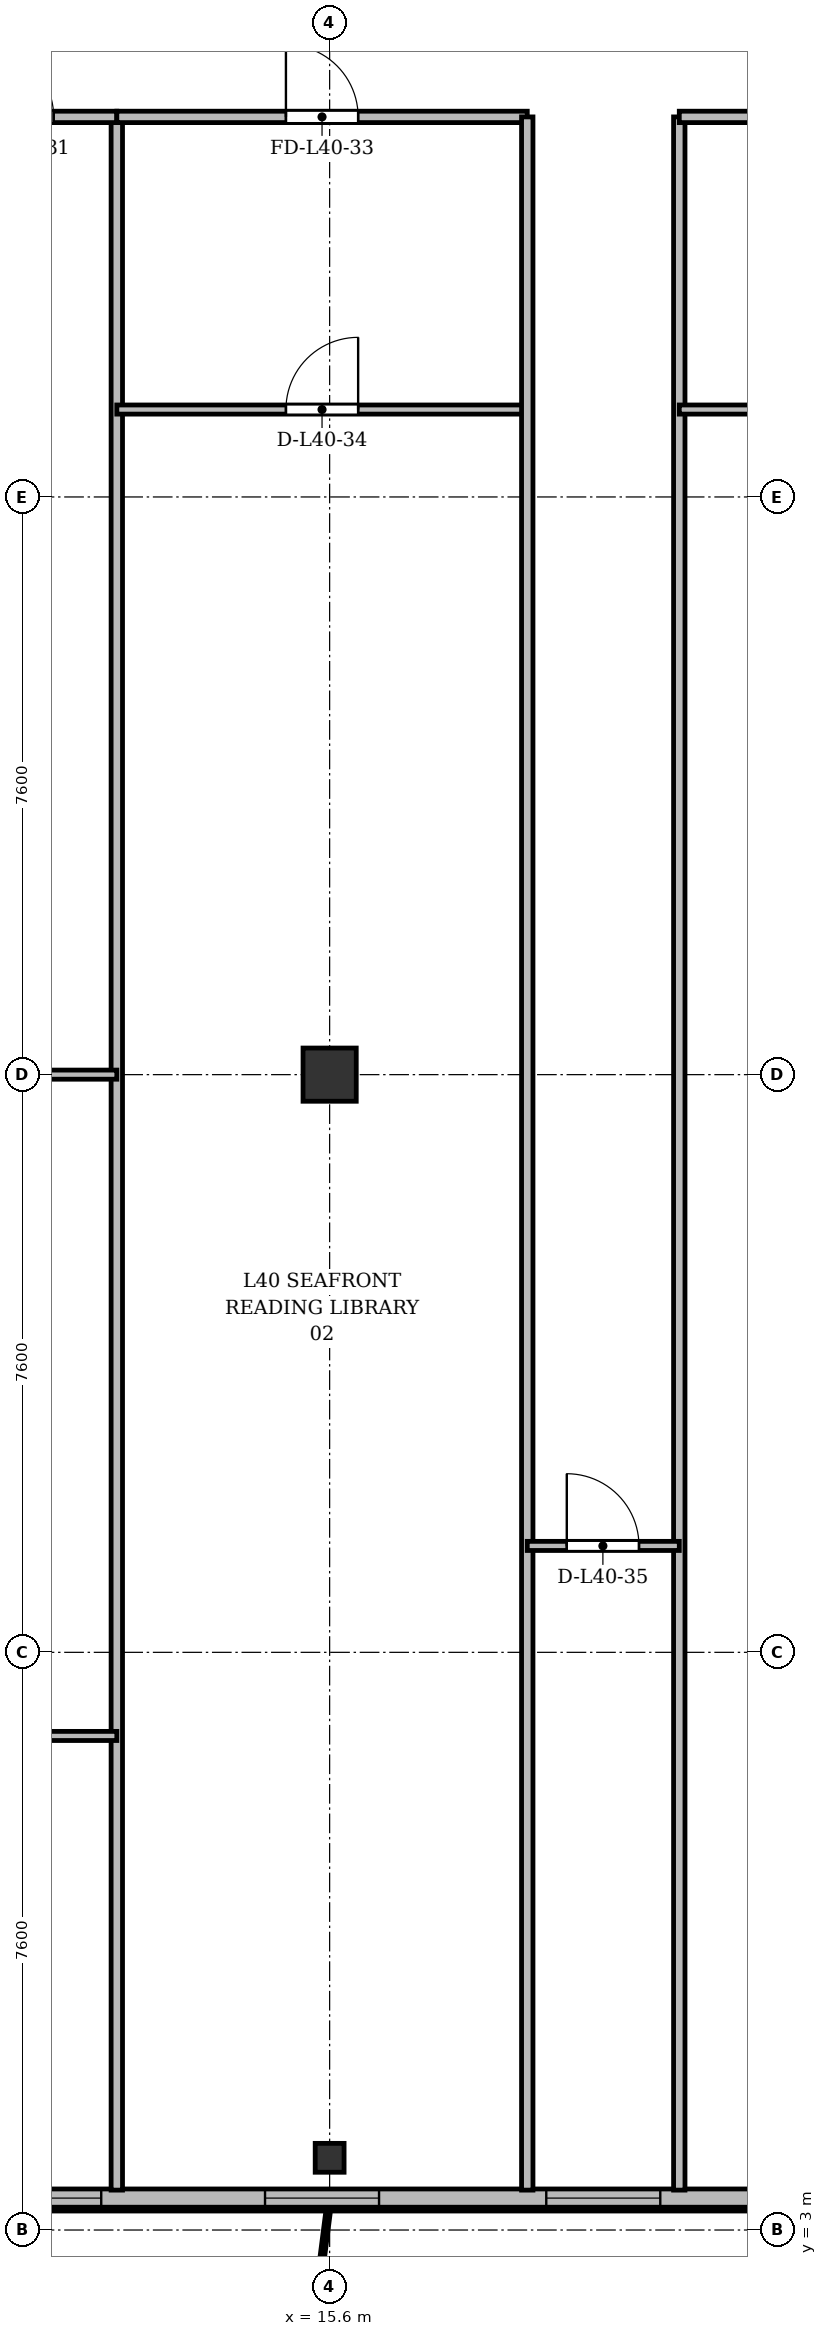
"""IFC4 building model, lengths in metres.
Left out: names, types, materials, properties, quantities, classifications, styles, units other than length and angle.
Written with IfcOpenShell. Run it as: python <this file> out.ifc"""

import sys

from ifc_helpers import new_model, si_unit, direction, frame, frame_2d, origin, origin_2d, place, context, subcontext, project, spatial, rectangle, i_section, extrude, source, transform, mapped, element, fill, save


model = new_model("IFC4")
c1 = context("Model", 3, precision=1e-05, world=origin(), true_north=direction((0.0, 1.0)))
c2 = subcontext(c1, "Body", "Model", "MODEL_VIEW")
j1 = project(units=[si_unit("LENGTHUNIT", "METRE"), si_unit("PLANEANGLEUNIT", "RADIAN")], contexts=[c1])
p1 = place(None, origin())
s1 = spatial("IfcSite", under=j1, at=p1, CompositionType="ELEMENT")
p2 = place(p1, origin())
s2 = spatial("IfcBuilding", under=s1, at=p2, CompositionType="ELEMENT")
p3 = place(p2, frame((0.0, 0.0, 153.7)))
s3 = spatial("IfcBuildingStorey", under=s2, at=p3, CompositionType="ELEMENT", Elevation=153.7)
m1 = source(origin(), c2, "Body", "SweptSolid", [
    extrude(i_section(OverallWidth=0.38, OverallDepth=0.38, WebThickness=0.02, FlangeThickness=0.03, at=origin_2d()), origin(), (0.0, 0.0, 1.0), 3.6),
])
p4 = place(p3, frame((15.6, 3.95, 0.0), z_axis=(0.0, 0.0, 1.0), x_axis=(1.0, 0.0, 0.0)))
e1 = element("IfcColumn", 1, at=p4, inside=s3, PredefinedType="COLUMN", context=c2, shape_type="MappedRepresentation", body=[
    mapped(m1, transform((0.0, 0.0, 0.0), x_axis=(1.0, 0.0, 0.0), y_axis=(0.0, 1.0, 0.0), z_axis=(0.0, 0.0, 1.0), scale=1.0)),
])
m2 = source(origin(), c2, "Body", "SweptSolid", [
    extrude(rectangle(XDim=0.7, YDim=0.7, at=origin_2d()), origin(), (0.0, 0.0, 1.0), 3.6),
])
p5 = place(p3, frame((15.6, 18.2, 0.0), z_axis=(0.0, 0.0, 1.0), x_axis=(1.0, 0.0, 0.0)))
e2 = element("IfcColumn", 2, at=p5, inside=s3, PredefinedType="COLUMN", context=c2, shape_type="MappedRepresentation", body=[
    mapped(m2, transform((0.0, 0.0, 0.0), x_axis=(1.0, 0.0, 0.0), y_axis=(0.0, 1.0, 0.0), z_axis=(0.0, 0.0, 1.0), scale=1.0)),
])
p6 = place(p3, frame((63.6, 3.42, 0.0), z_axis=(0.0, 0.0, 1.0), x_axis=(-1.0, 0.0, 0.0)))
e3 = element("IfcWall", 3, at=p6, inside=s3, PredefinedType="SOLIDWALL", context=c2, shape_type="SweptSolid", body=[
    extrude(rectangle(XDim=52.8, YDim=0.24, at=frame_2d((26.4, 0.0))), origin(), (0.0, 0.0, 1.0), 3.35),
])
p7 = place(p6, frame((0.295, 0.0, 0.9)))
e4 = element("IfcOpeningElement", 4, at=p7, cuts=e3, PredefinedType="OPENING", context=c2, shape_type="SweptSolid", body=[
    extrude(rectangle(XDim=1.5, YDim=1.75, at=frame_2d((0.75, 0.875))), frame((0.0, 0.13, 0.0), z_axis=(0.0, -1.0, 0.0), x_axis=(1.0, 0.0, 0.0)), (0.0, 0.0, 1.0), 0.26),
])
p8 = place(p6, frame((3.6, 0.0, 0.9)))
e5 = element("IfcOpeningElement", 5, at=p8, cuts=e3, PredefinedType="OPENING", context=c2, shape_type="SweptSolid", body=[
    extrude(rectangle(XDim=2.2, YDim=1.8, at=frame_2d((1.1, 0.9))), frame((0.0, 0.13, 0.0), z_axis=(0.0, -1.0, 0.0), x_axis=(1.0, 0.0, 0.0)), (0.0, 0.0, 1.0), 0.26),
])
p9 = place(p6, frame((7.635, 0.0, 0.0)))
e6 = element("IfcOpeningElement", 6, at=p9, cuts=e3, PredefinedType="OPENING", context=c2, shape_type="SweptSolid", body=[
    extrude(rectangle(XDim=1.2, YDim=2.2, at=frame_2d((0.6, 1.1))), frame((0.0, 0.13, 0.0), z_axis=(0.0, -1.0, 0.0), x_axis=(1.0, 0.0, 0.0)), (0.0, 0.0, 1.0), 0.26),
])
p10 = place(p6, frame((9.6, 0.0, 0.9)))
e7 = element("IfcOpeningElement", 7, at=p10, cuts=e3, PredefinedType="OPENING", context=c2, shape_type="SweptSolid", body=[
    extrude(rectangle(XDim=2.0, YDim=1.95, at=frame_2d((1.0, 0.975))), frame((0.0, 0.13, 0.0), z_axis=(0.0, -1.0, 0.0), x_axis=(1.0, 0.0, 0.0)), (0.0, 0.0, 1.0), 0.26),
])
p11 = place(p6, frame((12.175, 0.0, 0.9)))
e8 = element("IfcOpeningElement", 8, at=p11, cuts=e3, PredefinedType="OPENING", context=c2, shape_type="SweptSolid", body=[
    extrude(rectangle(XDim=1.65, YDim=1.85, at=frame_2d((0.825, 0.925))), frame((0.0, 0.13, 0.0), z_axis=(0.0, -1.0, 0.0), x_axis=(1.0, 0.0, 0.0)), (0.0, 0.0, 1.0), 0.26),
])
p12 = place(p6, frame((16.1, 0.0, 0.9)))
e9 = element("IfcOpeningElement", 9, at=p12, cuts=e3, PredefinedType="OPENING", context=c2, shape_type="SweptSolid", body=[
    extrude(rectangle(XDim=1.8, YDim=1.8, at=frame_2d((0.9, 0.9))), frame((0.0, 0.13, 0.0), z_axis=(0.0, -1.0, 0.0), x_axis=(1.0, 0.0, 0.0)), (0.0, 0.0, 1.0), 0.26),
])
p13 = place(p6, frame((22.3, 0.0, 0.9)))
e10 = element("IfcOpeningElement", 10, at=p13, cuts=e3, PredefinedType="OPENING", context=c2, shape_type="SweptSolid", body=[
    extrude(rectangle(XDim=2.2, YDim=1.8, at=frame_2d((1.1, 0.9))), frame((0.0, 0.13, 0.0), z_axis=(0.0, -1.0, 0.0), x_axis=(1.0, 0.0, 0.0)), (0.0, 0.0, 1.0), 0.26),
])
p14 = place(p6, frame((27.75, 0.0, 0.9)))
e11 = element("IfcOpeningElement", 11, at=p14, cuts=e3, PredefinedType="OPENING", context=c2, shape_type="SweptSolid", body=[
    extrude(rectangle(XDim=1.5, YDim=1.75, at=frame_2d((0.75, 0.875))), frame((0.0, 0.13, 0.0), z_axis=(0.0, -1.0, 0.0), x_axis=(1.0, 0.0, 0.0)), (0.0, 0.0, 1.0), 0.26),
])
p15 = place(p6, frame((30.5, 0.0, 0.9)))
e12 = element("IfcOpeningElement", 12, at=p15, cuts=e3, PredefinedType="OPENING", context=c2, shape_type="SweptSolid", body=[
    extrude(rectangle(XDim=2.0, YDim=1.95, at=frame_2d((1.0, 0.975))), frame((0.0, 0.13, 0.0), z_axis=(0.0, -1.0, 0.0), x_axis=(1.0, 0.0, 0.0)), (0.0, 0.0, 1.0), 0.26),
])
p16 = place(p6, frame((34.375, 0.0, 0.9)))
e13 = element("IfcOpeningElement", 13, at=p16, cuts=e3, PredefinedType="OPENING", context=c2, shape_type="SweptSolid", body=[
    extrude(rectangle(XDim=1.65, YDim=1.85, at=frame_2d((0.825, 0.925))), frame((0.0, 0.13, 0.0), z_axis=(0.0, -1.0, 0.0), x_axis=(1.0, 0.0, 0.0)), (0.0, 0.0, 1.0), 0.26),
])
p17 = place(p6, frame((39.5, 0.0, 0.9)))
e14 = element("IfcOpeningElement", 14, at=p17, cuts=e3, PredefinedType="OPENING", context=c2, shape_type="SweptSolid", body=[
    extrude(rectangle(XDim=1.8, YDim=1.8, at=frame_2d((0.9, 0.9))), frame((0.0, 0.13, 0.0), z_axis=(0.0, -1.0, 0.0), x_axis=(1.0, 0.0, 0.0)), (0.0, 0.0, 1.0), 0.26),
])
p18 = place(p6, frame((43.65, 0.0, 0.9)))
e15 = element("IfcOpeningElement", 15, at=p18, cuts=e3, PredefinedType="OPENING", context=c2, shape_type="SweptSolid", body=[
    extrude(rectangle(XDim=1.5, YDim=1.75, at=frame_2d((0.75, 0.875))), frame((0.0, 0.13, 0.0), z_axis=(0.0, -1.0, 0.0), x_axis=(1.0, 0.0, 0.0)), (0.0, 0.0, 1.0), 0.26),
])
p19 = place(p6, frame((47.35, 0.0, 0.9)))
e16 = element("IfcOpeningElement", 16, at=p19, cuts=e3, PredefinedType="OPENING", context=c2, shape_type="SweptSolid", body=[
    extrude(rectangle(XDim=1.5, YDim=1.75, at=frame_2d((0.75, 0.875))), frame((0.0, 0.13, 0.0), z_axis=(0.0, -1.0, 0.0), x_axis=(1.0, 0.0, 0.0)), (0.0, 0.0, 1.0), 0.26),
])
p20 = place(p6, frame((51.005, 0.0, 0.9)))
e17 = element("IfcOpeningElement", 17, at=p20, cuts=e3, PredefinedType="OPENING", context=c2, shape_type="SweptSolid", body=[
    extrude(rectangle(XDim=1.5, YDim=1.75, at=frame_2d((0.75, 0.875))), frame((0.0, 0.13, 0.0), z_axis=(0.0, -1.0, 0.0), x_axis=(1.0, 0.0, 0.0)), (0.0, 0.0, 1.0), 0.26),
])
p21 = place(p6, frame((37.85, 0.0, 0.0)))
e18 = element("IfcOpeningElement", 18, at=p21, cuts=e3, PredefinedType="OPENING", context=c2, shape_type="SweptSolid", body=[
    extrude(rectangle(XDim=1.2, YDim=2.2, at=frame_2d((0.6, 1.1))), frame((0.0, 0.13, 0.0), z_axis=(0.0, -1.0, 0.0), x_axis=(1.0, 0.0, 0.0)), (0.0, 0.0, 1.0), 0.26),
])
p22 = place(p3, frame((12.8, 3.525, 0.0), z_axis=(0.0, 0.0, 1.0), x_axis=(0.0, 1.0, 0.0)))
e19 = element("IfcWall", 19, at=p22, inside=s3, PredefinedType="PARTITIONING", context=c2, shape_type="SweptSolid", body=[
    extrude(rectangle(XDim=27.275, YDim=0.15, at=frame_2d((13.638, 0.0))), origin(), (0.0, 0.0, 1.0), 2.75),
])
p23 = place(p3, frame((8.04, 18.2, 0.0), z_axis=(0.0, 0.0, 1.0), x_axis=(1.0, 0.0, 0.0)))
e20 = element("IfcWall", 20, at=p23, inside=s3, PredefinedType="PARTITIONING", context=c2, shape_type="SweptSolid", body=[
    extrude(rectangle(XDim=4.76, YDim=0.12, at=frame_2d((2.38, 0.0))), origin(), (0.0, 0.0, 1.0), 2.75),
])
p24 = place(p23, frame((1.905, 0.0, 0.0)))
e21 = element("IfcOpeningElement", 21, at=p24, cuts=e20, PredefinedType="OPENING", context=c2, shape_type="SweptSolid", body=[
    extrude(rectangle(XDim=0.95, YDim=2.15, at=frame_2d((0.475, 1.075))), frame((0.0, 0.07, 0.0), z_axis=(0.0, -1.0, 0.0), x_axis=(1.0, 0.0, 0.0)), (0.0, 0.0, 1.0), 0.14),
])
p25 = place(p3, frame((8.025, 30.8, 0.0), z_axis=(0.0, 0.0, 1.0), x_axis=(1.0, 0.0, 0.0)))
e22 = element("IfcWall", 22, at=p25, inside=s3, PredefinedType="PARTITIONING", context=c2, shape_type="SweptSolid", body=[
    extrude(rectangle(XDim=4.775, YDim=0.15, at=frame_2d((2.388, 0.0))), origin(), (0.0, 0.0, 1.0), 2.85),
])
p26 = place(p25, frame((2.994, 0.0, 0.0)))
e23 = element("IfcOpeningElement", 23, at=p26, cuts=e22, PredefinedType="OPENING", context=c2, shape_type="SweptSolid", body=[
    extrude(rectangle(XDim=0.95, YDim=2.15, at=frame_2d((0.475, 1.075))), frame((0.0, 0.085, 0.0), z_axis=(0.0, -1.0, 0.0), x_axis=(1.0, 0.0, 0.0)), (0.0, 0.0, 1.0), 0.17),
])
p27 = place(p3, frame((8.04, 9.5, 0.0), z_axis=(0.0, 0.0, 1.0), x_axis=(1.0, 0.0, 0.0)))
e24 = element("IfcWall", 24, at=p27, inside=s3, PredefinedType="PARTITIONING", context=c2, shape_type="SweptSolid", body=[
    extrude(rectangle(XDim=4.76, YDim=0.12, at=frame_2d((2.38, 0.0))), origin(), (0.0, 0.0, 1.0), 2.85),
])
p28 = place(p27, frame((1.905, 0.0, 0.0)))
e25 = element("IfcOpeningElement", 25, at=p28, cuts=e24, PredefinedType="OPENING", context=c2, shape_type="SweptSolid", body=[
    extrude(rectangle(XDim=0.95, YDim=2.15, at=frame_2d((0.475, 1.075))), frame((0.0, 0.07, 0.0), z_axis=(0.0, -1.0, 0.0), x_axis=(1.0, 0.0, 0.0)), (0.0, 0.0, 1.0), 0.14),
])
p29 = place(p3, frame((12.8, 30.8, 0.0), z_axis=(0.0, 0.0, 1.0), x_axis=(1.0, 0.0, 0.0)))
e26 = element("IfcWall", 26, at=p29, inside=s3, PredefinedType="PARTITIONING", context=c2, shape_type="SweptSolid", body=[
    extrude(rectangle(XDim=5.4, YDim=0.15, at=frame_2d((2.7, 0.0))), origin(), (0.0, 0.0, 1.0), 2.85),
])
p30 = place(p29, frame((2.225, 0.0, 0.0)))
e27 = element("IfcOpeningElement", 27, at=p30, cuts=e26, PredefinedType="OPENING", context=c2, shape_type="SweptSolid", body=[
    extrude(rectangle(XDim=0.95, YDim=2.15, at=frame_2d((0.475, 1.075))), frame((0.0, 0.085, 0.0), z_axis=(0.0, -1.0, 0.0), x_axis=(1.0, 0.0, 0.0)), (0.0, 0.0, 1.0), 0.17),
])
p31 = place(p3, frame((12.8, 26.95, 0.0), z_axis=(0.0, 0.0, 1.0), x_axis=(1.0, 0.0, 0.0)))
e28 = element("IfcWall", 28, at=p31, inside=s3, PredefinedType="PARTITIONING", context=c2, shape_type="SweptSolid", body=[
    extrude(rectangle(XDim=5.4, YDim=0.12, at=frame_2d((2.7, 0.0))), origin(), (0.0, 0.0, 1.0), 2.85),
])
p32 = place(p31, frame((2.225, 0.0, 0.0)))
e29 = element("IfcOpeningElement", 29, at=p32, cuts=e28, PredefinedType="OPENING", context=c2, shape_type="SweptSolid", body=[
    extrude(rectangle(XDim=0.95, YDim=2.15, at=frame_2d((0.475, 1.075))), frame((0.0, 0.07, 0.0), z_axis=(0.0, -1.0, 0.0), x_axis=(1.0, 0.0, 0.0)), (0.0, 0.0, 1.0), 0.14),
])
for number, where, z_axis, x_axis in (
    (30, (18.2, 3.525, 0.0), (0.0, 0.0, 1.0), (0.0, 1.0, 0.0)),
    (31, (20.2, 3.525, 0.0), (0.0, 0.0, 1.0), (0.0, 1.0, 0.0)),
):
    element("IfcWall", number, at=place(p3, frame(where, z_axis=z_axis, x_axis=x_axis)), inside=s3, PredefinedType="PARTITIONING", context=c2, shape_type="SweptSolid", body=[
        extrude(rectangle(XDim=27.275, YDim=0.15, at=frame_2d((13.638, 0.0))), origin(), (0.0, 0.0, 1.0), 2.75),
    ])
p33 = place(p3, frame((18.2, 12.0, 0.0), z_axis=(0.0, 0.0, 1.0), x_axis=(1.0, 0.0, 0.0)))
e32 = element("IfcWall", 32, at=p33, inside=s3, PredefinedType="PARTITIONING", context=c2, shape_type="SweptSolid", body=[
    extrude(rectangle(XDim=2.0, YDim=0.12, at=frame_2d((1.0, 0.0))), origin(), (0.0, 0.0, 1.0), 3.35),
])
p34 = place(p33, frame((0.52, 0.0, 0.0)))
e33 = element("IfcOpeningElement", 33, at=p34, cuts=e32, PredefinedType="OPENING", context=c2, shape_type="SweptSolid", body=[
    extrude(rectangle(XDim=0.95, YDim=2.15, at=frame_2d((0.475, 1.075))), frame((0.0, 0.07, 0.0), z_axis=(0.0, -1.0, 0.0), x_axis=(1.0, 0.0, 0.0)), (0.0, 0.0, 1.0), 0.14),
])
p35 = place(p3, frame((20.2, 30.8, 0.0), z_axis=(0.0, 0.0, 1.0), x_axis=(1.0, 0.0, 0.0)))
e34 = element("IfcWall", 34, at=p35, inside=s3, PredefinedType="PARTITIONING", context=c2, shape_type="SweptSolid", body=[
    extrude(rectangle(XDim=6.0, YDim=0.15, at=frame_2d((3.0, 0.0))), origin(), (0.0, 0.0, 1.0), 2.85),
])
p36 = place(p35, frame((2.432, 0.0, 0.0)))
e35 = element("IfcOpeningElement", 35, at=p36, cuts=e34, PredefinedType="OPENING", context=c2, shape_type="SweptSolid", body=[
    extrude(rectangle(XDim=0.95, YDim=2.15, at=frame_2d((0.475, 1.075))), frame((0.0, 0.085, 0.0), z_axis=(0.0, -1.0, 0.0), x_axis=(1.0, 0.0, 0.0)), (0.0, 0.0, 1.0), 0.17),
])
p37 = place(p3, frame((20.2, 26.95, 0.0), z_axis=(0.0, 0.0, 1.0), x_axis=(1.0, 0.0, 0.0)))
e36 = element("IfcWall", 36, at=p37, inside=s3, PredefinedType="PARTITIONING", context=c2, shape_type="SweptSolid", body=[
    extrude(rectangle(XDim=6.0, YDim=0.12, at=frame_2d((3.0, 0.0))), origin(), (0.0, 0.0, 1.0), 2.85),
])
p38 = place(p37, frame((2.432, 0.0, 0.0)))
e37 = element("IfcOpeningElement", 37, at=p38, cuts=e36, PredefinedType="OPENING", context=c2, shape_type="SweptSolid", body=[
    extrude(rectangle(XDim=0.95, YDim=2.15, at=frame_2d((0.475, 1.075))), frame((0.0, 0.07, 0.0), z_axis=(0.0, -1.0, 0.0), x_axis=(1.0, 0.0, 0.0)), (0.0, 0.0, 1.0), 0.14),
])
m3 = source(origin(), c2, "Body", "SweptSolid", [
    extrude(rectangle(XDim=1.5, YDim=1.75, at=frame_2d((0.75, 0.875))), frame((0.0, 0.03, 0.0), z_axis=(0.0, -1.0, 0.0), x_axis=(1.0, 0.0, 0.0)), (0.0, 0.0, 1.0), 0.06),
])
p39 = place(p18, origin())
e38 = element("IfcWindow", 38, at=p39, inside=s3, PartitioningType="SINGLE_PANEL", PredefinedType="WINDOW", context=c2, shape_type="MappedRepresentation", body=[
    mapped(m3, transform((0.0, 0.0, 0.0), x_axis=(1.0, 0.0, 0.0), y_axis=(0.0, 1.0, 0.0), z_axis=(0.0, 0.0, 1.0), scale=1.0)),
])
fill(e15, e38)
p40 = place(p19, origin())
e39 = element("IfcWindow", 39, at=p40, inside=s3, PartitioningType="SINGLE_PANEL", PredefinedType="WINDOW", context=c2, shape_type="MappedRepresentation", body=[
    mapped(m3, transform((0.0, 0.0, 0.0), x_axis=(1.0, 0.0, 0.0), y_axis=(0.0, 1.0, 0.0), z_axis=(0.0, 0.0, 1.0), scale=1.0)),
])
fill(e16, e39)
p41 = place(p20, origin())
e40 = element("IfcWindow", 40, at=p41, inside=s3, PartitioningType="SINGLE_PANEL", PredefinedType="WINDOW", context=c2, shape_type="MappedRepresentation", body=[
    mapped(m3, transform((0.0, 0.0, 0.0), x_axis=(1.0, 0.0, 0.0), y_axis=(0.0, 1.0, 0.0), z_axis=(0.0, 0.0, 1.0), scale=1.0)),
])
fill(e17, e40)
m4 = source(origin(), c2, "Body", "SweptSolid", [
    extrude(rectangle(XDim=0.95, YDim=2.15, at=frame_2d((0.475, 1.075))), frame((0.0, 0.025, 0.0), z_axis=(0.0, -1.0, 0.0), x_axis=(1.0, 0.0, 0.0)), (0.0, 0.0, 1.0), 0.05),
])
p42 = place(p26, origin())
e41 = element("IfcDoor", 41, at=p42, inside=s3, OperationType="SINGLE_SWING_LEFT", PredefinedType="DOOR", context=c2, shape_type="MappedRepresentation", body=[
    mapped(m4, transform((0.0, 0.0, 0.0), x_axis=(1.0, 0.0, 0.0), y_axis=(0.0, 1.0, 0.0), z_axis=(0.0, 0.0, 1.0), scale=1.0)),
])
fill(e23, e41)
p43 = place(p30, origin())
e42 = element("IfcDoor", 42, at=p43, inside=s3, OperationType="SINGLE_SWING_LEFT", PredefinedType="DOOR", context=c2, shape_type="MappedRepresentation", body=[
    mapped(m4, transform((0.0, 0.0, 0.0), x_axis=(1.0, 0.0, 0.0), y_axis=(0.0, 1.0, 0.0), z_axis=(0.0, 0.0, 1.0), scale=1.0)),
])
fill(e27, e42)
p44 = place(p32, origin())
e43 = element("IfcDoor", 43, at=p44, inside=s3, OperationType="SINGLE_SWING_RIGHT", PredefinedType="DOOR", context=c2, shape_type="MappedRepresentation", body=[
    mapped(m4, transform((0.0, 0.0, 0.0), x_axis=(1.0, 0.0, 0.0), y_axis=(0.0, 1.0, 0.0), z_axis=(0.0, 0.0, 1.0), scale=1.0)),
])
fill(e29, e43)
p45 = place(p34, origin())
e44 = element("IfcDoor", 44, at=p45, inside=s3, OperationType="SINGLE_SWING_LEFT", PredefinedType="DOOR", context=c2, shape_type="MappedRepresentation", body=[
    mapped(m4, transform((0.0, 0.0, 0.0), x_axis=(1.0, 0.0, 0.0), y_axis=(0.0, 1.0, 0.0), z_axis=(0.0, 0.0, 1.0), scale=1.0)),
])
fill(e33, e44)
save(model, sys.argv[1])
